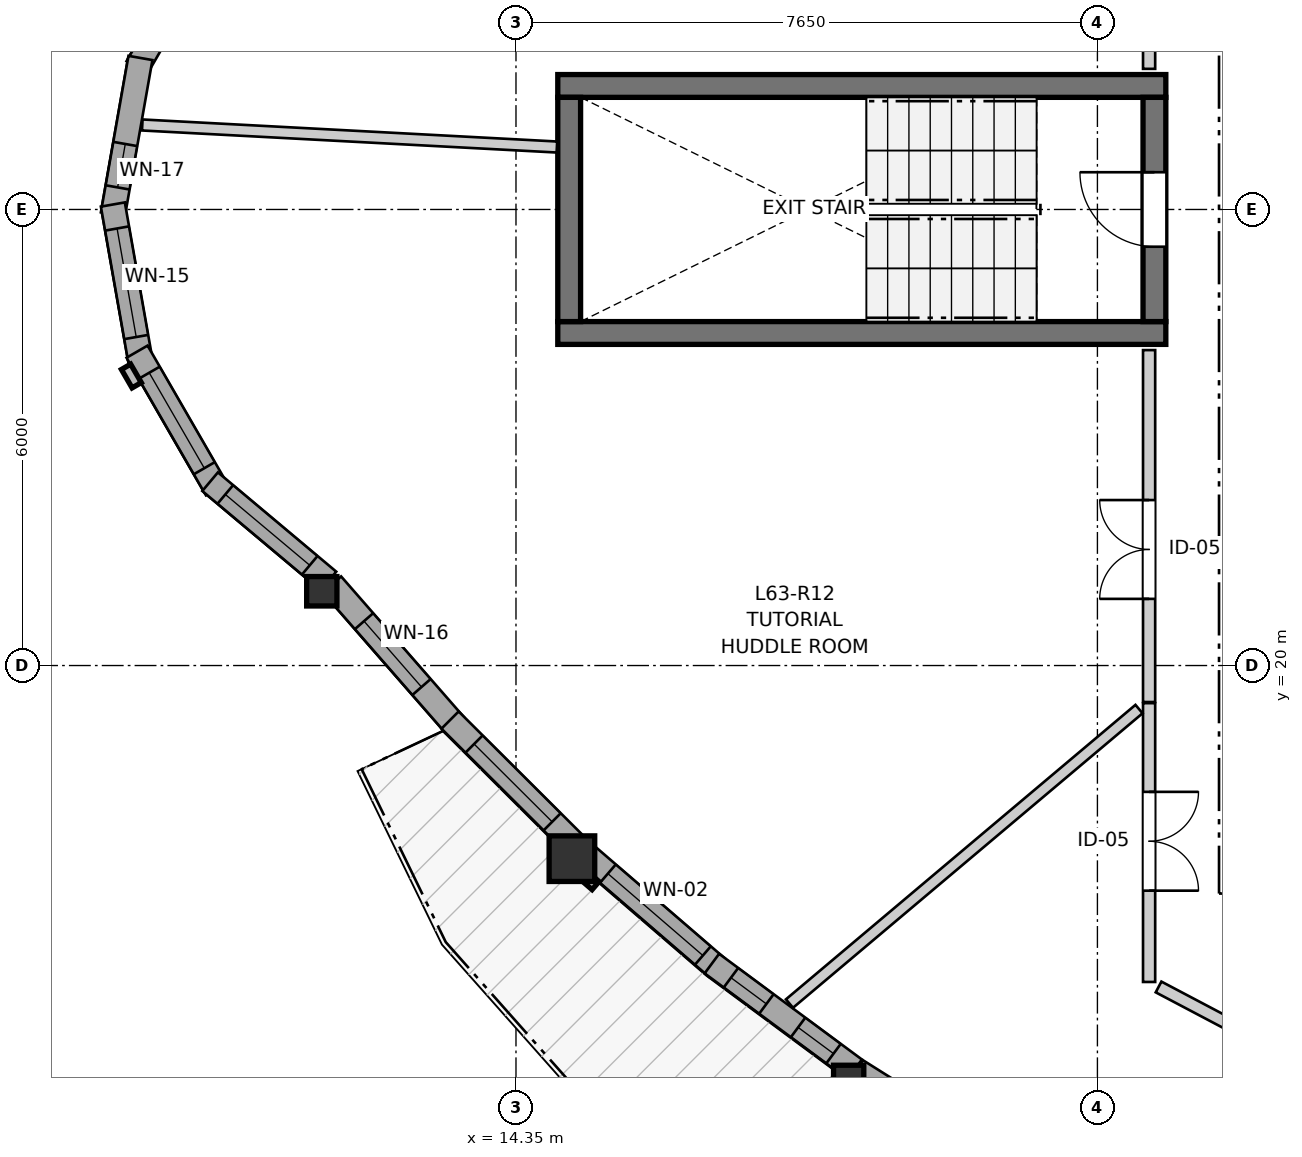
"""IFC4 building model, lengths in metres.
Left out: names, types, materials, properties, quantities, classifications, styles, units other than length and angle.
Written with IfcOpenShell. Run it as: python <this file> out.ifc"""

import sys

from ifc_helpers import new_model, si_unit, direction, frame, frame_2d, origin, origin_2d, place, context, subcontext, project, spatial, rectangle, i_section, extrude, source, transform, mapped, element, fill, save


model = new_model("IFC4")
c1 = context("Model", 3, precision=1e-05, world=origin(), true_north=direction((0.0, 1.0)))
c2 = subcontext(c1, "Body", "Model", "MODEL_VIEW")
j1 = project(units=[si_unit("LENGTHUNIT", "METRE"), si_unit("PLANEANGLEUNIT", "RADIAN")], contexts=[c1])
p1 = place(None, origin())
s1 = spatial("IfcSite", under=j1, at=p1, CompositionType="ELEMENT")
p2 = place(p1, origin())
s2 = spatial("IfcBuilding", under=s1, at=p2, CompositionType="ELEMENT")
p3 = place(p2, frame((0.0, 0.0, 211.6)))
s3 = spatial("IfcBuildingStorey", under=s2, at=p3, CompositionType="ELEMENT", Elevation=211.6)
for number, where, z_axis, x_axis in (
    (1, (14.9, 24.375, 0.0), (0.0, 0.0, 1.0), (1.0, 0.0, 0.0)),
    (2, (22.9, 27.625, 0.0), (0.0, 0.0, 1.0), (-1.0, 0.0, 0.0)),
):
    element("IfcWall", number, at=place(p3, frame(where, z_axis=z_axis, x_axis=x_axis)), inside=s3, PredefinedType="SHEAR", context=c2, shape_type="SweptSolid", body=[
        extrude(rectangle(XDim=8.0, YDim=0.3, at=frame_2d((4.0, 0.0))), origin(), (0.0, 0.0, 1.0), 2.96),
    ])
p4 = place(p3, frame((15.05, 27.475, 0.0), z_axis=(0.0, 0.0, 1.0), x_axis=(0.0, -1.0, 0.0)))
e3 = element("IfcWall", 3, at=p4, inside=s3, PredefinedType="SHEAR", context=c2, shape_type="SweptSolid", body=[
    extrude(rectangle(XDim=2.95, YDim=0.3, at=frame_2d((1.475, 0.0))), origin(), (0.0, 0.0, 1.0), 2.96),
])
p5 = place(p3, frame((22.75, 24.525, 0.0), z_axis=(0.0, 0.0, 1.0), x_axis=(0.0, 1.0, 0.0)))
e4 = element("IfcWall", 4, at=p5, inside=s3, PredefinedType="SHEAR", context=c2, shape_type="SweptSolid", body=[
    extrude(rectangle(XDim=2.95, YDim=0.3, at=frame_2d((1.475, 0.0))), origin(), (0.0, 0.0, 1.0), 2.96),
])
p6 = place(p5, frame((0.985, 0.0, 0.0)))
e5 = element("IfcOpeningElement", 5, at=p6, cuts=e4, PredefinedType="OPENING", context=c2, shape_type="SweptSolid", body=[
    extrude(rectangle(XDim=0.98, YDim=2.15, at=frame_2d((0.49, 1.075))), frame((0.0, 0.16, 0.0), z_axis=(0.0, -1.0, 0.0), x_axis=(1.0, 0.0, 0.0)), (0.0, 0.0, 1.0), 0.32),
])
m1 = source(origin(), c2, "Body", "SweptSolid", [
    extrude(i_section(OverallWidth=0.398, OverallDepth=0.387, WebThickness=0.019, FlangeThickness=0.03, FilletRadius=0.015, at=origin_2d()), origin(), (0.0, 0.0, 1.0), 2.96),
])
p7 = place(p3, frame((11.795, 20.977, 0.0), z_axis=(0.0, 0.0, 1.0), x_axis=(1.0, 0.0, 0.0)))
e6 = element("IfcColumn", 6, at=p7, inside=s3, PredefinedType="PILASTER", context=c2, shape_type="MappedRepresentation", body=[
    mapped(m1, transform((0.0, 0.0, 0.0), x_axis=(1.0, 0.0, 0.0), y_axis=(0.0, 1.0, 0.0), z_axis=(0.0, 0.0, 1.0), scale=1.0)),
])
m2 = source(origin(), c2, "Body", "SweptSolid", [
    extrude(rectangle(XDim=0.6, YDim=0.6, at=origin_2d()), origin(), (0.0, 0.0, 1.0), 2.96),
])
p8 = place(p3, frame((15.086, 17.459, 0.0), z_axis=(0.0, 0.0, 1.0), x_axis=(1.0, 0.0, 0.0)))
e7 = element("IfcColumn", 7, at=p8, inside=s3, PredefinedType="COLUMN", context=c2, shape_type="MappedRepresentation", body=[
    mapped(m2, transform((0.0, 0.0, 0.0), x_axis=(1.0, 0.0, 0.0), y_axis=(0.0, 1.0, 0.0), z_axis=(0.0, 0.0, 1.0), scale=1.0)),
])
p9 = place(p3, frame((18.727, 14.548, 0.0), z_axis=(0.0, 0.0, 1.0), x_axis=(1.0, 0.0, 0.0)))
e8 = element("IfcColumn", 8, at=p9, inside=s3, PredefinedType="PILASTER", context=c2, shape_type="MappedRepresentation", body=[
    mapped(m1, transform((0.0, 0.0, 0.0), x_axis=(1.0, 0.0, 0.0), y_axis=(0.0, 1.0, 0.0), z_axis=(0.0, 0.0, 1.0), scale=1.0)),
])
p10 = place(p3, frame((10.409, 29.681, 0.0), z_axis=(0.0, 0.0, 1.0), x_axis=(-0.49990781971, -0.866078617559, 0.0)))
e9 = element("IfcWall", 9, at=p10, inside=s3, PredefinedType="SOLIDWALL", context=c2, shape_type="SweptSolid", body=[
    extrude(rectangle(XDim=2.09, YDim=0.32, at=frame_2d((1.045, 0.0))), origin(), (0.0, 0.0, 1.0), 2.58),
])
p11 = place(p10, frame((0.42, 0.0, 0.82)))
e10 = element("IfcOpeningElement", 10, at=p11, cuts=e9, PredefinedType="OPENING", context=c2, shape_type="SweptSolid", body=[
    extrude(rectangle(XDim=1.25, YDim=1.35, at=frame_2d((0.625, 0.675))), frame((0.0, 0.17, 0.0), z_axis=(0.0, -1.0, 0.0), x_axis=(1.0, 0.0, 0.0)), (0.0, 0.0, 1.0), 0.34),
])
p12 = place(p3, frame((9.409, 27.993, 0.0), z_axis=(0.0, 0.0, 1.0), x_axis=(-0.173672066494, -0.984803540469, 0.0)))
e11 = element("IfcWall", 11, at=p12, inside=s3, PredefinedType="SOLIDWALL", context=c2, shape_type="SweptSolid", body=[
    extrude(rectangle(XDim=2.09, YDim=0.32, at=frame_2d((1.045, 0.0))), origin(), (0.0, 0.0, 1.0), 2.58),
])
p13 = place(p12, frame((1.149, 0.0, 0.82)))
e12 = element("IfcOpeningElement", 12, at=p13, cuts=e11, PredefinedType="OPENING", context=c2, shape_type="SweptSolid", body=[
    extrude(rectangle(XDim=0.58, YDim=1.35, at=frame_2d((0.29, 0.675))), frame((0.0, 0.17, 0.0), z_axis=(0.0, -1.0, 0.0), x_axis=(1.0, 0.0, 0.0)), (0.0, 0.0, 1.0), 0.34),
])
p14 = place(p3, frame((9.046, 26.065, 0.0), z_axis=(0.0, 0.0, 1.0), x_axis=(0.173672066494, -0.984803540469, 0.0)))
e13 = element("IfcWall", 13, at=p14, inside=s3, PredefinedType="SOLIDWALL", context=c2, shape_type="SweptSolid", body=[
    extrude(rectangle(XDim=2.09, YDim=0.32, at=frame_2d((1.045, 0.0))), origin(), (0.0, 0.0, 1.0), 2.58),
])
p15 = place(p14, frame((0.32, 0.0, 0.82)))
e14 = element("IfcOpeningElement", 14, at=p15, cuts=e13, PredefinedType="OPENING", context=c2, shape_type="SweptSolid", body=[
    extrude(rectangle(XDim=1.45, YDim=1.25, at=frame_2d((0.725, 0.625))), frame((0.0, 0.17, 0.0), z_axis=(0.0, -1.0, 0.0), x_axis=(1.0, 0.0, 0.0)), (0.0, 0.0, 1.0), 0.34),
])
p16 = place(p3, frame((9.365, 24.129, 0.0), z_axis=(0.0, 0.0, 1.0), x_axis=(0.49990781971, -0.866078617559, 0.0)))
e15 = element("IfcWall", 15, at=p16, inside=s3, PredefinedType="SOLIDWALL", context=c2, shape_type="SweptSolid", body=[
    extrude(rectangle(XDim=2.09, YDim=0.32, at=frame_2d((1.045, 0.0))), origin(), (0.0, 0.0, 1.0), 2.58),
])
p17 = place(p16, frame((0.32, 0.0, 0.82)))
e16 = element("IfcOpeningElement", 16, at=p17, cuts=e15, PredefinedType="OPENING", context=c2, shape_type="SweptSolid", body=[
    extrude(rectangle(XDim=1.45, YDim=1.25, at=frame_2d((0.725, 0.625))), frame((0.0, 0.17, 0.0), z_axis=(0.0, -1.0, 0.0), x_axis=(1.0, 0.0, 0.0)), (0.0, 0.0, 1.0), 0.34),
])
p18 = place(p3, frame((10.326, 22.419, 0.0), z_axis=(0.0, 0.0, 1.0), x_axis=(0.766099948115, -0.642721455608, 0.0)))
e17 = element("IfcWall", 17, at=p18, inside=s3, PredefinedType="SOLIDWALL", context=c2, shape_type="SweptSolid", body=[
    extrude(rectangle(XDim=2.032, YDim=0.32, at=frame_2d((1.016, 0.0))), origin(), (0.0, 0.0, 1.0), 2.58),
])
p19 = place(p18, frame((0.261, 0.0, 0.82)))
e18 = element("IfcOpeningElement", 18, at=p19, cuts=e17, PredefinedType="OPENING", context=c2, shape_type="SweptSolid", body=[
    extrude(rectangle(XDim=1.45, YDim=1.25, at=frame_2d((0.725, 0.625))), frame((0.0, 0.17, 0.0), z_axis=(0.0, -1.0, 0.0), x_axis=(1.0, 0.0, 0.0)), (0.0, 0.0, 1.0), 0.34),
])
p20 = place(p3, frame((11.929, 21.067, 0.0), z_axis=(0.0, 0.0, 1.0), x_axis=(0.657623588515, -0.753346677054, 0.0)))
e19 = element("IfcWall", 19, at=p20, inside=s3, PredefinedType="SOLIDWALL", context=c2, shape_type="SweptSolid", body=[
    extrude(rectangle(XDim=2.454, YDim=0.32, at=frame_2d((1.227, 0.0))), origin(), (0.0, 0.0, 1.0), 2.58),
])
p21 = place(p20, frame((0.642, 0.0, 0.82)))
e20 = element("IfcOpeningElement", 20, at=p21, cuts=e19, PredefinedType="OPENING", context=c2, shape_type="SweptSolid", body=[
    extrude(rectangle(XDim=1.15, YDim=1.2, at=frame_2d((0.575, 0.6))), frame((0.0, 0.17, 0.0), z_axis=(0.0, -1.0, 0.0), x_axis=(1.0, 0.0, 0.0)), (0.0, 0.0, 1.0), 0.34),
])
p22 = place(p3, frame((13.483, 19.282, 0.0), z_axis=(0.0, 0.0, 1.0), x_axis=(0.7083616261, -0.70584970544, 0.0)))
e21 = element("IfcWall", 21, at=p22, inside=s3, PredefinedType="SOLIDWALL", context=c2, shape_type="SweptSolid", body=[
    extrude(rectangle(XDim=2.333, YDim=0.32, at=frame_2d((1.166, 0.0))), origin(), (0.0, 0.0, 1.0), 2.58),
])
p23 = place(p22, frame((0.446, 0.0, 0.82)))
e22 = element("IfcOpeningElement", 22, at=p23, cuts=e21, PredefinedType="OPENING", context=c2, shape_type="SweptSolid", body=[
    extrude(rectangle(XDim=1.45, YDim=1.25, at=frame_2d((0.725, 0.625))), frame((0.0, 0.17, 0.0), z_axis=(0.0, -1.0, 0.0), x_axis=(1.0, 0.0, 0.0)), (0.0, 0.0, 1.0), 0.34),
])
p24 = place(p3, frame((15.259, 17.521, 0.0), z_axis=(0.0, 0.0, 1.0), x_axis=(0.757533377792, -0.652796431923, 0.0)))
e23 = element("IfcWall", 23, at=p24, inside=s3, PredefinedType="SOLIDWALL", context=c2, shape_type="SweptSolid", body=[
    extrude(rectangle(XDim=2.294, YDim=0.32, at=frame_2d((1.147, 0.0))), origin(), (0.0, 0.0, 1.0), 2.58),
])
p25 = place(p24, frame((0.397, 0.0, 0.82)))
e24 = element("IfcOpeningElement", 24, at=p25, cuts=e23, PredefinedType="OPENING", context=c2, shape_type="SweptSolid", body=[
    extrude(rectangle(XDim=1.65, YDim=1.45, at=frame_2d((0.825, 0.725))), frame((0.0, 0.17, 0.0), z_axis=(0.0, -1.0, 0.0), x_axis=(1.0, 0.0, 0.0)), (0.0, 0.0, 1.0), 0.34),
])
p26 = place(p3, frame((16.927, 16.079, 0.0), z_axis=(0.0, 0.0, 1.0), x_axis=(0.803843896942, -0.594840305754, 0.0)))
e25 = element("IfcWall", 25, at=p26, inside=s3, PredefinedType="SOLIDWALL", context=c2, shape_type="SweptSolid", body=[
    extrude(rectangle(XDim=2.337, YDim=0.32, at=frame_2d((1.169, 0.0))), origin(), (0.0, 0.0, 1.0), 2.58),
])
p27 = place(p26, frame((0.312, 0.0, 0.82)))
e26 = element("IfcOpeningElement", 26, at=p27, cuts=e25, PredefinedType="OPENING", context=c2, shape_type="SweptSolid", body=[
    extrude(rectangle(XDim=0.58, YDim=1.35, at=frame_2d((0.29, 0.675))), frame((0.0, 0.17, 0.0), z_axis=(0.0, -1.0, 0.0), x_axis=(1.0, 0.0, 0.0)), (0.0, 0.0, 1.0), 0.34),
])
p28 = place(p26, frame((1.411, 0.0, 0.82)))
e27 = element("IfcOpeningElement", 27, at=p28, cuts=e25, PredefinedType="OPENING", context=c2, shape_type="SweptSolid", body=[
    extrude(rectangle(XDim=0.58, YDim=1.35, at=frame_2d((0.29, 0.675))), frame((0.0, 0.17, 0.0), z_axis=(0.0, -1.0, 0.0), x_axis=(1.0, 0.0, 0.0)), (0.0, 0.0, 1.0), 0.34),
])
p29 = place(p3, frame((18.829, 14.673, 0.0), z_axis=(0.0, 0.0, 1.0), x_axis=(0.846418748285, -0.53251788942, 0.0)))
e28 = element("IfcWall", 28, at=p29, inside=s3, PredefinedType="SOLIDWALL", context=c2, shape_type="SweptSolid", body=[
    extrude(rectangle(XDim=2.324, YDim=0.32, at=frame_2d((1.162, 0.0))), origin(), (0.0, 0.0, 1.0), 2.58),
])
p30 = place(p29, frame((0.477, 0.0, 0.82)))
e29 = element("IfcOpeningElement", 29, at=p30, cuts=e28, PredefinedType="OPENING", context=c2, shape_type="SweptSolid", body=[
    extrude(rectangle(XDim=1.35, YDim=1.45, at=frame_2d((0.675, 0.725))), frame((0.0, 0.17, 0.0), z_axis=(0.0, -1.0, 0.0), x_axis=(1.0, 0.0, 0.0)), (0.0, 0.0, 1.0), 0.34),
])
p31 = place(p3, frame((22.68, 19.52, 0.0), z_axis=(0.0, 0.0, 1.0), x_axis=(0.0, 1.0, 0.0)))
e30 = element("IfcWall", 30, at=p31, inside=s3, PredefinedType="PARTITIONING", context=c2, shape_type="SweptSolid", body=[
    extrude(rectangle(XDim=4.63, YDim=0.16, at=frame_2d((2.315, 0.0))), origin(), (0.0, 0.0, 1.0), 2.96),
])
p32 = place(p31, frame((1.357, 0.0, 0.0)))
e31 = element("IfcOpeningElement", 31, at=p32, cuts=e30, PredefinedType="OPENING", context=c2, shape_type="SweptSolid", body=[
    extrude(rectangle(XDim=1.3, YDim=2.1, at=frame_2d((0.65, 1.05))), frame((0.0, 0.09, 0.0), z_axis=(0.0, -1.0, 0.0), x_axis=(1.0, 0.0, 0.0)), (0.0, 0.0, 1.0), 0.18),
])
p33 = place(p3, frame((22.68, 19.505, 0.0), z_axis=(0.0, 0.0, 1.0), x_axis=(0.0, -1.0, 0.0)))
e32 = element("IfcWall", 32, at=p33, inside=s3, PredefinedType="PARTITIONING", context=c2, shape_type="SweptSolid", body=[
    extrude(rectangle(XDim=3.668, YDim=0.16, at=frame_2d((1.834, 0.0))), origin(), (0.0, 0.0, 1.0), 2.96),
])
p34 = place(p33, frame((1.167, 0.0, 0.0)))
e33 = element("IfcOpeningElement", 33, at=p34, cuts=e32, PredefinedType="OPENING", context=c2, shape_type="SweptSolid", body=[
    extrude(rectangle(XDim=1.3, YDim=2.1, at=frame_2d((0.65, 1.05))), frame((0.0, 0.09, 0.0), z_axis=(0.0, -1.0, 0.0), x_axis=(1.0, 0.0, 0.0)), (0.0, 0.0, 1.0), 0.18),
])
p35 = place(p3, frame((22.68, 27.85, 0.0), z_axis=(0.0, 0.0, 1.0), x_axis=(0.0, 1.0, 0.0)))
e34 = element("IfcWall", 34, at=p35, inside=s3, PredefinedType="PARTITIONING", context=c2, shape_type="SweptSolid", body=[
    extrude(rectangle(XDim=1.929, YDim=0.16, at=frame_2d((0.964, 0.0))), origin(), (0.0, 0.0, 1.0), 2.96),
])
p36 = place(p35, frame((0.53, 0.0, 0.0)))
e35 = element("IfcOpeningElement", 35, at=p36, cuts=e34, PredefinedType="OPENING", context=c2, shape_type="SweptSolid", body=[
    extrude(rectangle(XDim=0.96, YDim=2.1, at=frame_2d((0.48, 1.05))), frame((0.0, 0.09, 0.0), z_axis=(0.0, -1.0, 0.0), x_axis=(1.0, 0.0, 0.0)), (0.0, 0.0, 1.0), 0.18),
])
p37 = place(p3, frame((17.948, 15.553, 0.0), z_axis=(0.0, 0.0, 1.0), x_axis=(0.764805901006, 0.644260765364, 0.0)))
e36 = element("IfcWall", 36, at=p37, inside=s3, PredefinedType="PARTITIONING", context=c2, shape_type="SweptSolid", body=[
    extrude(rectangle(XDim=6.013, YDim=0.145, at=frame_2d((3.007, 0.0))), origin(), (0.0, 0.0, 1.0), 2.96),
])
p38 = place(p3, frame((9.433, 27.112, 0.0), z_axis=(0.0, 0.0, 1.0), x_axis=(0.998589537807, -0.053093643525, 0.0)))
e37 = element("IfcWall", 37, at=p38, inside=s3, PredefinedType="PARTITIONING", context=c2, shape_type="SweptSolid", body=[
    extrude(rectangle(XDim=5.463, YDim=0.145, at=frame_2d((2.731, 0.0))), origin(), (0.0, 0.0, 1.0), 2.96),
])
p39 = place(p3, frame((22.804, 15.771, 0.0), z_axis=(0.0, 0.0, 1.0), x_axis=(0.884421402819, -0.4666891709, 0.0)))
e38 = element("IfcWall", 38, at=p39, inside=s3, PredefinedType="PARTITIONING", context=c2, shape_type="SweptSolid", body=[
    extrude(rectangle(XDim=1.451, YDim=0.16, at=frame_2d((0.726, 0.0))), origin(), (0.0, 0.0, 1.0), 2.96),
])
m3 = source(origin(), c2, "Body", "SweptSolid", [
    extrude(rectangle(XDim=0.58, YDim=1.35, at=frame_2d((0.29, 0.675))), frame((0.0, 0.03, 0.0), z_axis=(0.0, -1.0, 0.0), x_axis=(1.0, 0.0, 0.0)), (0.0, 0.0, 1.0), 0.06),
])
p40 = place(p13, origin())
e39 = element("IfcWindow", 39, at=p40, inside=s3, PartitioningType="SINGLE_PANEL", PredefinedType="WINDOW", context=c2, shape_type="MappedRepresentation", body=[
    mapped(m3, transform((0.0, 0.0, 0.0), x_axis=(1.0, 0.0, 0.0), y_axis=(0.0, 1.0, 0.0), z_axis=(0.0, 0.0, 1.0), scale=1.0)),
])
fill(e12, e39)
m4 = source(origin(), c2, "Body", "SweptSolid", [
    extrude(rectangle(XDim=1.45, YDim=1.25, at=frame_2d((0.725, 0.625))), frame((0.0, 0.03, 0.0), z_axis=(0.0, -1.0, 0.0), x_axis=(1.0, 0.0, 0.0)), (0.0, 0.0, 1.0), 0.06),
])
p41 = place(p15, origin())
e40 = element("IfcWindow", 40, at=p41, inside=s3, PartitioningType="SINGLE_PANEL", PredefinedType="WINDOW", context=c2, shape_type="MappedRepresentation", body=[
    mapped(m4, transform((0.0, 0.0, 0.0), x_axis=(1.0, 0.0, 0.0), y_axis=(0.0, 1.0, 0.0), z_axis=(0.0, 0.0, 1.0), scale=1.0)),
])
fill(e14, e40)
p42 = place(p17, origin())
e41 = element("IfcWindow", 41, at=p42, inside=s3, PartitioningType="SINGLE_PANEL", PredefinedType="WINDOW", context=c2, shape_type="MappedRepresentation", body=[
    mapped(m4, transform((0.0, 0.0, 0.0), x_axis=(1.0, 0.0, 0.0), y_axis=(0.0, 1.0, 0.0), z_axis=(0.0, 0.0, 1.0), scale=1.0)),
])
fill(e16, e41)
p43 = place(p19, origin())
e42 = element("IfcWindow", 42, at=p43, inside=s3, PartitioningType="SINGLE_PANEL", PredefinedType="WINDOW", context=c2, shape_type="MappedRepresentation", body=[
    mapped(m4, transform((0.0, 0.0, 0.0), x_axis=(1.0, 0.0, 0.0), y_axis=(0.0, 1.0, 0.0), z_axis=(0.0, 0.0, 1.0), scale=1.0)),
])
fill(e18, e42)
m5 = source(origin(), c2, "Body", "SweptSolid", [
    extrude(rectangle(XDim=1.15, YDim=1.2, at=frame_2d((0.575, 0.6))), frame((0.0, 0.03, 0.0), z_axis=(0.0, -1.0, 0.0), x_axis=(1.0, 0.0, 0.0)), (0.0, 0.0, 1.0), 0.06),
])
p44 = place(p21, origin())
e43 = element("IfcWindow", 43, at=p44, inside=s3, PartitioningType="SINGLE_PANEL", PredefinedType="WINDOW", context=c2, shape_type="MappedRepresentation", body=[
    mapped(m5, transform((0.0, 0.0, 0.0), x_axis=(1.0, 0.0, 0.0), y_axis=(0.0, 1.0, 0.0), z_axis=(0.0, 0.0, 1.0), scale=1.0)),
])
fill(e20, e43)
p45 = place(p23, origin())
e44 = element("IfcWindow", 44, at=p45, inside=s3, PartitioningType="SINGLE_PANEL", PredefinedType="WINDOW", context=c2, shape_type="MappedRepresentation", body=[
    mapped(m4, transform((0.0, 0.0, 0.0), x_axis=(1.0, 0.0, 0.0), y_axis=(0.0, 1.0, 0.0), z_axis=(0.0, 0.0, 1.0), scale=1.0)),
])
fill(e22, e44)
m6 = source(origin(), c2, "Body", "SweptSolid", [
    extrude(rectangle(XDim=1.65, YDim=1.45, at=frame_2d((0.825, 0.725))), frame((0.0, 0.03, 0.0), z_axis=(0.0, -1.0, 0.0), x_axis=(1.0, 0.0, 0.0)), (0.0, 0.0, 1.0), 0.06),
])
p46 = place(p25, origin())
e45 = element("IfcWindow", 45, at=p46, inside=s3, PartitioningType="SINGLE_PANEL", PredefinedType="WINDOW", context=c2, shape_type="MappedRepresentation", body=[
    mapped(m6, transform((0.0, 0.0, 0.0), x_axis=(1.0, 0.0, 0.0), y_axis=(0.0, 1.0, 0.0), z_axis=(0.0, 0.0, 1.0), scale=1.0)),
])
fill(e24, e45)
p47 = place(p27, origin())
e46 = element("IfcWindow", 46, at=p47, inside=s3, PartitioningType="SINGLE_PANEL", PredefinedType="WINDOW", context=c2, shape_type="MappedRepresentation", body=[
    mapped(m3, transform((0.0, 0.0, 0.0), x_axis=(1.0, 0.0, 0.0), y_axis=(0.0, 1.0, 0.0), z_axis=(0.0, 0.0, 1.0), scale=1.0)),
])
fill(e26, e46)
p48 = place(p28, origin())
e47 = element("IfcWindow", 47, at=p48, inside=s3, PartitioningType="SINGLE_PANEL", PredefinedType="WINDOW", context=c2, shape_type="MappedRepresentation", body=[
    mapped(m3, transform((0.0, 0.0, 0.0), x_axis=(1.0, 0.0, 0.0), y_axis=(0.0, 1.0, 0.0), z_axis=(0.0, 0.0, 1.0), scale=1.0)),
])
fill(e27, e47)
m7 = source(origin(), c2, "Body", "SweptSolid", [
    extrude(rectangle(XDim=0.98, YDim=2.15, at=frame_2d((0.49, 1.075))), frame((0.0, 0.025, 0.0), z_axis=(0.0, -1.0, 0.0), x_axis=(1.0, 0.0, 0.0)), (0.0, 0.0, 1.0), 0.05),
])
p49 = place(p6, origin())
e48 = element("IfcDoor", 48, at=p49, inside=s3, OperationType="SINGLE_SWING_RIGHT", PredefinedType="DOOR", context=c2, shape_type="MappedRepresentation", body=[
    mapped(m7, transform((0.0, 0.0, 0.0), x_axis=(1.0, 0.0, 0.0), y_axis=(0.0, 1.0, 0.0), z_axis=(0.0, 0.0, 1.0), scale=1.0)),
])
fill(e5, e48)
m8 = source(origin(), c2, "Body", "SweptSolid", [
    extrude(rectangle(XDim=1.3, YDim=2.1, at=frame_2d((0.65, 1.05))), frame((0.0, 0.025, 0.0), z_axis=(0.0, -1.0, 0.0), x_axis=(1.0, 0.0, 0.0)), (0.0, 0.0, 1.0), 0.05),
])
p50 = place(p32, origin())
e49 = element("IfcDoor", 49, at=p50, inside=s3, OperationType="DOUBLE_DOOR_SINGLE_SWING", PredefinedType="DOOR", context=c2, shape_type="MappedRepresentation", body=[
    mapped(m8, transform((0.0, 0.0, 0.0), x_axis=(1.0, 0.0, 0.0), y_axis=(0.0, 1.0, 0.0), z_axis=(0.0, 0.0, 1.0), scale=1.0)),
])
fill(e31, e49)
p51 = place(p34, origin())
e50 = element("IfcDoor", 50, at=p51, inside=s3, OperationType="DOUBLE_DOOR_SINGLE_SWING", PredefinedType="DOOR", context=c2, shape_type="MappedRepresentation", body=[
    mapped(m8, transform((0.0, 0.0, 0.0), x_axis=(1.0, 0.0, 0.0), y_axis=(0.0, 1.0, 0.0), z_axis=(0.0, 0.0, 1.0), scale=1.0)),
])
fill(e33, e50)
save(model, sys.argv[1])
